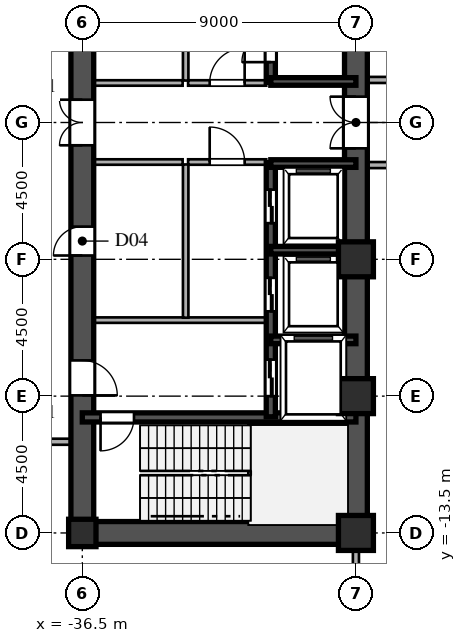
"""IFC4 building model, lengths in metres.
Left out: names, types, materials, properties, quantities, classifications, styles, units other than length and angle.
Written with IfcOpenShell. Run it as: python <this file> out.ifc"""

import sys

from ifc_helpers import new_model, si_unit, direction, frame, frame_2d, origin, origin_2d, place, context, subcontext, project, spatial, rectangle, hollow_rectangle, i_section, extrude, source, transform, mapped, element, fill, save


model = new_model("IFC4")
c1 = context("Model", 3, precision=1e-05, world=origin(), true_north=direction((0.0, 1.0)))
c2 = subcontext(c1, "Body", "Model", "MODEL_VIEW")
j1 = project(units=[si_unit("LENGTHUNIT", "METRE"), si_unit("PLANEANGLEUNIT", "RADIAN")], contexts=[c1])
p1 = place(None, origin())
s1 = spatial("IfcSite", under=j1, at=p1, CompositionType="ELEMENT")
p2 = place(p1, origin())
s2 = spatial("IfcBuilding", under=s1, at=p2, CompositionType="ELEMENT")
p3 = place(p2, frame((0.0, 0.0, -9.6)))
s3 = spatial("IfcBuildingStorey", under=s2, at=p3, CompositionType="ELEMENT", Elevation=-9.6)
m1 = source(origin(), c2, "Body", "SweptSolid", [
    extrude(hollow_rectangle(XDim=1.15, YDim=1.15, WallThickness=0.048, at=origin_2d()), origin(), (0.0, 0.0, 1.0), 4.8),
])
for number, where, z_axis, x_axis in (
    (1, (-27.5, -13.5, 0.0), (0.0, 0.0, 1.0), (1.0, 0.0, 0.0)),
    (2, (-27.5, -9.0, 0.0), (0.0, 0.0, 1.0), (1.0, 0.0, 0.0)),
    (3, (-27.5, -4.5, 0.0), (0.0, 0.0, 1.0), (1.0, 0.0, 0.0)),
):
    element("IfcColumn", number, at=place(p3, frame(where, z_axis=z_axis, x_axis=x_axis)), inside=s3, PredefinedType="COLUMN", context=c2, shape_type="MappedRepresentation", body=[
        mapped(m1, transform((0.0, 0.0, 0.0), scale=1.0)),
    ])
m2 = source(origin(), c2, "Body", "SweptSolid", [
    extrude(i_section(OverallWidth=0.9, OverallDepth=0.9, WebThickness=0.036, FlangeThickness=0.055, at=origin_2d()), origin(), (0.0, 0.0, 1.0), 4.8),
])
p4 = place(p3, frame((-36.5, -13.5, 0.0), z_axis=(0.0, 0.0, 1.0), x_axis=(1.0, 0.0, 0.0)))
e4 = element("IfcColumn", 4, at=p4, inside=s3, PredefinedType="COLUMN", context=c2, shape_type="MappedRepresentation", body=[
    mapped(m2, transform((0.0, 0.0, 0.0), scale=1.0)),
])
for number, where, z_axis, x_axis in (
    (5, (-27.5, -13.5, 0.0), (0.0, 0.0, 1.0), (0.0, 1.0, 0.0)),
    (6, (-27.5, 1.3, 0.0), (0.0, 0.0, 1.0), (0.0, 1.0, 0.0)),
):
    element("IfcWall", number, at=place(p3, frame(where, z_axis=z_axis, x_axis=x_axis)), inside=s3, PredefinedType="SHEAR", context=c2, shape_type="SweptSolid", body=[
        extrude(rectangle(XDim=12.2, YDim=0.75, at=frame_2d((6.1, 0.0))), origin(), (0.0, 0.0, 1.0), 4.5),
    ])
p5 = place(p3, frame((-27.5, -1.3, 0.0), z_axis=(0.0, 0.0, 1.0), x_axis=(0.0, 1.0, 0.0)))
e7 = element("IfcWall", 7, at=p5, inside=s3, PredefinedType="SHEAR", context=c2, shape_type="SweptSolid", body=[
    extrude(rectangle(XDim=2.6, YDim=0.75, at=frame_2d((1.3, 0.0))), origin(), (0.0, 0.0, 1.0), 4.5),
])
p6 = place(p5, frame((0.45, 0.0, 0.0)))
e8 = element("IfcOpeningElement", 8, at=p6, cuts=e7, PredefinedType="OPENING", context=c2, shape_type="SweptSolid", body=[
    extrude(rectangle(XDim=1.7, YDim=2.35, at=frame_2d((0.85, 1.175))), frame((0.0, 0.385, 0.0), z_axis=(0.0, -1.0, 0.0), x_axis=(1.0, 0.0, 0.0)), (0.0, 0.0, 1.0), 0.77),
])
p7 = place(p3, frame((-36.5, -13.5, 0.0), z_axis=(0.0, 0.0, 1.0), x_axis=(1.0, 0.0, 0.0)))
e9 = element("IfcWall", 9, at=p7, inside=s3, PredefinedType="SHEAR", context=c2, shape_type="SweptSolid", body=[
    extrude(rectangle(XDim=9.0, YDim=0.75, at=frame_2d((4.5, 0.0))), origin(), (0.0, 0.0, 1.0), 4.5),
])
p8 = place(p3, frame((-36.5, -13.65, 0.0), z_axis=(0.0, 0.0, 1.0), x_axis=(0.0, 1.0, 0.0)))
e10 = element("IfcWall", 10, at=p8, inside=s3, PredefinedType="SHEAR", context=c2, shape_type="SweptSolid", body=[
    extrude(rectangle(XDim=7.15, YDim=0.75, at=frame_2d((3.575, 0.0))), origin(), (0.0, 0.0, 1.0), 4.5),
])
p9 = place(p8, frame((4.675, 0.0, 0.0)))
e11 = element("IfcOpeningElement", 11, at=p9, cuts=e10, PredefinedType="OPENING", context=c2, shape_type="SweptSolid", body=[
    extrude(rectangle(XDim=1.15, YDim=2.2, at=frame_2d((0.575, 1.1))), frame((0.0, 0.385, 0.0), z_axis=(0.0, -1.0, 0.0), x_axis=(1.0, 0.0, 0.0)), (0.0, 0.0, 1.0), 0.77),
])
p10 = place(p3, frame((-36.5, -1.3, 0.0), z_axis=(0.0, 0.0, 1.0), x_axis=(0.0, 1.0, 0.0)))
e12 = element("IfcWall", 12, at=p10, inside=s3, PredefinedType="SHEAR", context=c2, shape_type="SweptSolid", body=[
    extrude(rectangle(XDim=2.6, YDim=0.75, at=frame_2d((1.3, 0.0))), origin(), (0.0, 0.0, 1.0), 4.5),
])
p11 = place(p10, frame((0.55, 0.0, 0.0)))
e13 = element("IfcOpeningElement", 13, at=p11, cuts=e12, PredefinedType="OPENING", context=c2, shape_type="SweptSolid", body=[
    extrude(rectangle(XDim=1.5, YDim=2.3, at=frame_2d((0.75, 1.15))), frame((0.0, 0.385, 0.0), z_axis=(0.0, -1.0, 0.0), x_axis=(1.0, 0.0, 0.0)), (0.0, 0.0, 1.0), 0.77),
])
p12 = place(p3, frame((-36.5, -6.5, 0.0), z_axis=(0.0, 0.0, 1.0), x_axis=(0.0, 1.0, 0.0)))
e14 = element("IfcWall", 14, at=p12, inside=s3, PredefinedType="SHEAR", context=c2, shape_type="SweptSolid", body=[
    extrude(rectangle(XDim=5.2, YDim=0.75, at=frame_2d((2.6, 0.0))), origin(), (0.0, 0.0, 1.0), 4.5),
])
p13 = place(p12, frame((2.125, 0.0, 0.0)))
e15 = element("IfcOpeningElement", 15, at=p13, cuts=e14, PredefinedType="OPENING", context=c2, shape_type="SweptSolid", body=[
    extrude(rectangle(XDim=0.95, YDim=2.15, at=frame_2d((0.475, 1.075))), frame((0.0, 0.385, 0.0), z_axis=(0.0, -1.0, 0.0), x_axis=(1.0, 0.0, 0.0)), (0.0, 0.0, 1.0), 0.77),
])
p14 = place(p3, frame((-36.5, 1.3, 0.0), z_axis=(0.0, 0.0, 1.0), x_axis=(0.0, 1.0, 0.0)))
e16 = element("IfcWall", 16, at=p14, inside=s3, PredefinedType="SHEAR", context=c2, shape_type="SweptSolid", body=[
    extrude(rectangle(XDim=6.9, YDim=0.75, at=frame_2d((3.45, 0.0))), origin(), (0.0, 0.0, 1.0), 4.5),
])
p15 = place(p14, frame((2.975, 0.0, 0.0)))
e17 = element("IfcOpeningElement", 17, at=p15, cuts=e16, PredefinedType="OPENING", context=c2, shape_type="SweptSolid", body=[
    extrude(rectangle(XDim=0.95, YDim=2.15, at=frame_2d((0.475, 1.075))), frame((0.0, 0.385, 0.0), z_axis=(0.0, -1.0, 0.0), x_axis=(1.0, 0.0, 0.0)), (0.0, 0.0, 1.0), 0.77),
])
p16 = place(p3, frame((-36.5, -9.7, 0.0), z_axis=(0.0, 0.0, 1.0), x_axis=(1.0, 0.0, 0.0)))
e18 = element("IfcWall", 18, at=p16, inside=s3, PredefinedType="SHEAR", context=c2, shape_type="SweptSolid", body=[
    extrude(rectangle(XDim=9.0, YDim=0.3, at=frame_2d((4.5, 0.0))), origin(), (0.0, 0.0, 1.0), 4.5),
])
p17 = place(p16, frame((0.6, 0.0, 0.0)))
e19 = element("IfcOpeningElement", 19, at=p17, cuts=e18, PredefinedType="OPENING", context=c2, shape_type="SweptSolid", body=[
    extrude(rectangle(XDim=1.1, YDim=2.2, at=frame_2d((0.55, 1.1))), frame((0.0, 0.16, 0.0), z_axis=(0.0, -1.0, 0.0), x_axis=(1.0, 0.0, 0.0)), (0.0, 0.0, 1.0), 0.32),
])
for number, where, z_axis, x_axis in (
    (20, (-30.3, -7.15, 0.0), (0.0, 0.0, 1.0), (1.0, 0.0, 0.0)),
    (21, (-30.3, -4.2, 0.0), (0.0, 0.0, 1.0), (1.0, 0.0, 0.0)),
    (22, (-30.3, -1.35, 0.0), (0.0, 0.0, 1.0), (1.0, 0.0, 0.0)),
    (23, (-30.3, 1.35, 0.0), (0.0, 0.0, 1.0), (1.0, 0.0, 0.0)),
):
    element("IfcWall", number, at=place(p3, frame(where, z_axis=z_axis, x_axis=x_axis)), inside=s3, PredefinedType="SHEAR", context=c2, shape_type="SweptSolid", body=[
        extrude(rectangle(XDim=2.8, YDim=0.25, at=frame_2d((1.4, 0.0))), origin(), (0.0, 0.0, 1.0), 4.5),
    ])
p18 = place(p3, frame((-30.3, -9.68, 0.0), z_axis=(0.0, 0.0, 1.0), x_axis=(0.0, 1.0, 0.0)))
e24 = element("IfcWall", 24, at=p18, inside=s3, PredefinedType="SHEAR", context=c2, shape_type="SweptSolid", body=[
    extrude(rectangle(XDim=2.56, YDim=0.3, at=frame_2d((1.28, 0.0))), origin(), (0.0, 0.0, 1.0), 4.5),
])
p19 = place(p18, frame((0.68, 0.0, 0.0)))
e25 = element("IfcOpeningElement", 25, at=p19, cuts=e24, PredefinedType="OPENING", context=c2, shape_type="SweptSolid", body=[
    extrude(rectangle(XDim=1.2, YDim=2.25, at=frame_2d((0.6, 1.125))), frame((0.0, 0.16, 0.0), z_axis=(0.0, -1.0, 0.0), x_axis=(1.0, 0.0, 0.0)), (0.0, 0.0, 1.0), 0.32),
])
p20 = place(p3, frame((-30.3, -7.12, 0.0), z_axis=(0.0, 0.0, 1.0), x_axis=(0.0, 1.0, 0.0)))
e26 = element("IfcWall", 26, at=p20, inside=s3, PredefinedType="SHEAR", context=c2, shape_type="SweptSolid", body=[
    extrude(rectangle(XDim=2.92, YDim=0.3, at=frame_2d((1.46, 0.0))), origin(), (0.0, 0.0, 1.0), 4.5),
])
p21 = place(p20, frame((0.91, 0.0, 0.0)))
e27 = element("IfcOpeningElement", 27, at=p21, cuts=e26, PredefinedType="OPENING", context=c2, shape_type="SweptSolid", body=[
    extrude(rectangle(XDim=1.1, YDim=2.2, at=frame_2d((0.55, 1.1))), frame((0.0, 0.16, 0.0), z_axis=(0.0, -1.0, 0.0), x_axis=(1.0, 0.0, 0.0)), (0.0, 0.0, 1.0), 0.32),
])
p22 = place(p3, frame((-30.3, -4.2, 0.0), z_axis=(0.0, 0.0, 1.0), x_axis=(0.0, 1.0, 0.0)))
e28 = element("IfcWall", 28, at=p22, inside=s3, PredefinedType="SHEAR", context=c2, shape_type="SweptSolid", body=[
    extrude(rectangle(XDim=2.88, YDim=0.3, at=frame_2d((1.44, 0.0))), origin(), (0.0, 0.0, 1.0), 4.5),
])
p23 = place(p22, frame((0.89, 0.0, 0.0)))
e29 = element("IfcOpeningElement", 29, at=p23, cuts=e28, PredefinedType="OPENING", context=c2, shape_type="SweptSolid", body=[
    extrude(rectangle(XDim=1.1, YDim=2.2, at=frame_2d((0.55, 1.1))), frame((0.0, 0.16, 0.0), z_axis=(0.0, -1.0, 0.0), x_axis=(1.0, 0.0, 0.0)), (0.0, 0.0, 1.0), 0.32),
])
p24 = place(p3, frame((-30.3, 1.32, 0.0), z_axis=(0.0, 0.0, 1.0), x_axis=(0.0, 1.0, 0.0)))
e30 = element("IfcWall", 30, at=p24, inside=s3, PredefinedType="SHEAR", context=c2, shape_type="SweptSolid", body=[
    extrude(rectangle(XDim=2.28, YDim=0.3, at=frame_2d((1.14, 0.0))), origin(), (0.0, 0.0, 1.0), 4.5),
])
p25 = place(p24, frame((0.665, 0.0, 0.0)))
e31 = element("IfcOpeningElement", 31, at=p25, cuts=e30, PredefinedType="OPENING", context=c2, shape_type="SweptSolid", body=[
    extrude(rectangle(XDim=0.95, YDim=2.15, at=frame_2d((0.475, 1.075))), frame((0.0, 0.16, 0.0), z_axis=(0.0, -1.0, 0.0), x_axis=(1.0, 0.0, 0.0)), (0.0, 0.0, 1.0), 0.32),
])
p26 = place(p3, frame((-36.15, -6.5, 0.0), z_axis=(0.0, 0.0, 1.0), x_axis=(1.0, 0.0, 0.0)))
e32 = element("IfcWall", 32, at=p26, inside=s3, PredefinedType="PARTITIONING", context=c2, shape_type="SweptSolid", body=[
    extrude(rectangle(XDim=5.7, YDim=0.18, at=frame_2d((2.85, 0.0))), origin(), (0.0, 0.0, 1.0), 4.5),
])
p27 = place(p3, frame((-33.1, -6.42, 0.0), z_axis=(0.0, 0.0, 1.0), x_axis=(0.0, 1.0, 0.0)))
e33 = element("IfcWall", 33, at=p27, inside=s3, PredefinedType="PARTITIONING", context=c2, shape_type="SweptSolid", body=[
    extrude(rectangle(XDim=5.04, YDim=0.18, at=frame_2d((2.52, 0.0))), origin(), (0.0, 0.0, 1.0), 4.5),
])
p28 = place(p3, frame((-33.1, 1.38, 0.0), z_axis=(0.0, 0.0, 1.0), x_axis=(0.0, 1.0, 0.0)))
e34 = element("IfcWall", 34, at=p28, inside=s3, PredefinedType="PARTITIONING", context=c2, shape_type="SweptSolid", body=[
    extrude(rectangle(XDim=6.74, YDim=0.18, at=frame_2d((3.37, 0.0))), origin(), (0.0, 0.0, 1.0), 4.5),
])
p29 = place(p3, frame((-33.02, -1.3, 0.0), z_axis=(0.0, 0.0, 1.0), x_axis=(1.0, 0.0, 0.0)))
e35 = element("IfcWall", 35, at=p29, inside=s3, PredefinedType="PARTITIONING", context=c2, shape_type="SweptSolid", body=[
    extrude(rectangle(XDim=2.57, YDim=0.18, at=frame_2d((1.285, 0.0))), origin(), (0.0, 0.0, 1.0), 4.5),
])
p30 = place(p29, frame((0.71, 0.0, 0.0)))
e36 = element("IfcOpeningElement", 36, at=p30, cuts=e35, PredefinedType="OPENING", context=c2, shape_type="SweptSolid", body=[
    extrude(rectangle(XDim=1.15, YDim=2.2, at=frame_2d((0.575, 1.1))), frame((0.0, 0.1, 0.0), z_axis=(0.0, -1.0, 0.0), x_axis=(1.0, 0.0, 0.0)), (0.0, 0.0, 1.0), 0.2),
])
p31 = place(p3, frame((-33.02, 1.3, 0.0), z_axis=(0.0, 0.0, 1.0), x_axis=(1.0, 0.0, 0.0)))
e37 = element("IfcWall", 37, at=p31, inside=s3, PredefinedType="PARTITIONING", context=c2, shape_type="SweptSolid", body=[
    extrude(rectangle(XDim=2.57, YDim=0.18, at=frame_2d((1.285, 0.0))), origin(), (0.0, 0.0, 1.0), 4.5),
])
p32 = place(p31, frame((0.71, 0.0, 0.0)))
e38 = element("IfcOpeningElement", 38, at=p32, cuts=e37, PredefinedType="OPENING", context=c2, shape_type="SweptSolid", body=[
    extrude(rectangle(XDim=1.15, YDim=2.2, at=frame_2d((0.575, 1.1))), frame((0.0, 0.1, 0.0), z_axis=(0.0, -1.0, 0.0), x_axis=(1.0, 0.0, 0.0)), (0.0, 0.0, 1.0), 0.2),
])
for number, where, z_axis, x_axis in (
    (39, (-36.15, -1.3, 0.0), (0.0, 0.0, 1.0), (1.0, 0.0, 0.0)),
    (40, (-36.15, 1.3, 0.0), (0.0, 0.0, 1.0), (1.0, 0.0, 0.0)),
):
    element("IfcWall", number, at=place(p3, frame(where, z_axis=z_axis, x_axis=x_axis)), inside=s3, PredefinedType="PARTITIONING", context=c2, shape_type="SweptSolid", body=[
        extrude(rectangle(XDim=2.95, YDim=0.18, at=frame_2d((1.475, 0.0))), origin(), (0.0, 0.0, 1.0), 4.5),
    ])
p33 = place(p3, frame((-38.915, -10.5, 0.0), z_axis=(0.0, 0.0, 1.0), x_axis=(1.0, 0.0, 0.0)))
e41 = element("IfcWall", 41, at=p33, inside=s3, PredefinedType="PARTITIONING", context=c2, shape_type="SweptSolid", body=[
    extrude(rectangle(XDim=2.035, YDim=0.2, at=frame_2d((1.018, 0.0))), origin(), (0.0, 0.0, 1.0), 4.5),
])
p34 = place(p3, frame((-27.12, -1.4, 0.0), z_axis=(0.0, 0.0, 1.0), x_axis=(1.0, 0.0, 0.0)))
e42 = element("IfcWall", 42, at=p34, inside=s3, PredefinedType="PARTITIONING", context=c2, shape_type="SweptSolid", body=[
    extrude(rectangle(XDim=54.24, YDim=0.2, at=frame_2d((27.12, 0.0))), origin(), (0.0, 0.0, 1.0), 4.5),
])
p35 = place(p34, frame((15.545, 0.0, 0.0)))
e43 = element("IfcOpeningElement", 43, at=p35, cuts=e42, PredefinedType="OPENING", context=c2, shape_type="SweptSolid", body=[
    extrude(rectangle(XDim=1.15, YDim=2.2, at=frame_2d((0.575, 1.1))), frame((0.0, 0.11, 0.0), z_axis=(0.0, -1.0, 0.0), x_axis=(1.0, 0.0, 0.0)), (0.0, 0.0, 1.0), 0.22),
])
p36 = place(p34, frame((37.545, 0.0, 0.0)))
e44 = element("IfcOpeningElement", 44, at=p36, cuts=e42, PredefinedType="OPENING", context=c2, shape_type="SweptSolid", body=[
    extrude(rectangle(XDim=1.15, YDim=2.2, at=frame_2d((0.575, 1.1))), frame((0.0, 0.11, 0.0), z_axis=(0.0, -1.0, 0.0), x_axis=(1.0, 0.0, 0.0)), (0.0, 0.0, 1.0), 0.22),
])
p37 = place(p3, frame((-27.12, 1.4, 0.0), z_axis=(0.0, 0.0, 1.0), x_axis=(1.0, 0.0, 0.0)))
e45 = element("IfcWall", 45, at=p37, inside=s3, PredefinedType="PARTITIONING", context=c2, shape_type="SweptSolid", body=[
    extrude(rectangle(XDim=54.24, YDim=0.2, at=frame_2d((27.12, 0.0))), origin(), (0.0, 0.0, 1.0), 4.5),
])
p38 = place(p37, frame((19.545, 0.0, 0.0)))
e46 = element("IfcOpeningElement", 46, at=p38, cuts=e45, PredefinedType="OPENING", context=c2, shape_type="SweptSolid", body=[
    extrude(rectangle(XDim=1.15, YDim=2.2, at=frame_2d((0.575, 1.1))), frame((0.0, 0.11, 0.0), z_axis=(0.0, -1.0, 0.0), x_axis=(1.0, 0.0, 0.0)), (0.0, 0.0, 1.0), 0.22),
])
p39 = place(p37, frame((46.93, 0.0, 0.0)))
e47 = element("IfcOpeningElement", 47, at=p39, cuts=e45, PredefinedType="OPENING", context=c2, shape_type="SweptSolid", body=[
    extrude(rectangle(XDim=0.88, YDim=2.1, at=frame_2d((0.44, 1.05))), frame((0.0, 0.11, 0.0), z_axis=(0.0, -1.0, 0.0), x_axis=(1.0, 0.0, 0.0)), (0.0, 0.0, 1.0), 0.22),
])
p40 = place(p3, frame((-27.5, -21.812, 0.0), z_axis=(0.0, 0.0, 1.0), x_axis=(0.0, 1.0, 0.0)))
e48 = element("IfcWall", 48, at=p40, inside=s3, PredefinedType="PARTITIONING", context=c2, shape_type="SweptSolid", body=[
    extrude(rectangle(XDim=7.933, YDim=0.2, at=frame_2d((3.966, 0.0))), origin(), (0.0, 0.0, 1.0), 3.912),
])
m3 = source(origin(), c2, "Body", "SweptSolid", [
    extrude(rectangle(XDim=1.7, YDim=2.35, at=frame_2d((0.85, 1.175))), frame((0.0, 0.025, 0.0), z_axis=(0.0, -1.0, 0.0), x_axis=(1.0, 0.0, 0.0)), (0.0, 0.0, 1.0), 0.05),
])
p41 = place(p6, origin())
e49 = element("IfcDoor", 49, at=p41, inside=s3, OperationType="DOUBLE_SWING_LEFT", PredefinedType="DOOR", context=c2, shape_type="MappedRepresentation", body=[
    mapped(m3, transform((0.0, 0.0, 0.0), scale=1.0)),
])
fill(e8, e49)
m4 = source(origin(), c2, "Body", "SweptSolid", [
    extrude(rectangle(XDim=1.15, YDim=2.2, at=frame_2d((0.575, 1.1))), frame((0.0, 0.025, 0.0), z_axis=(0.0, -1.0, 0.0), x_axis=(1.0, 0.0, 0.0)), (0.0, 0.0, 1.0), 0.05),
])
p42 = place(p9, frame((1.15, 0.0, 0.0), z_axis=(0.0, 0.0, 1.0), x_axis=(-1.0, 0.0, 0.0)))
e50 = element("IfcDoor", 50, at=p42, inside=s3, OperationType="SINGLE_SWING_LEFT", PredefinedType="DOOR", context=c2, shape_type="MappedRepresentation", body=[
    mapped(m4, transform((0.0, 0.0, 0.0), scale=1.0)),
])
fill(e11, e50)
m5 = source(origin(), c2, "Body", "SweptSolid", [
    extrude(rectangle(XDim=1.5, YDim=2.3, at=frame_2d((0.75, 1.15))), frame((0.0, 0.025, 0.0), z_axis=(0.0, -1.0, 0.0), x_axis=(1.0, 0.0, 0.0)), (0.0, 0.0, 1.0), 0.05),
])
p43 = place(p11, origin())
e51 = element("IfcDoor", 51, at=p43, inside=s3, OperationType="DOUBLE_SWING_LEFT", PredefinedType="DOOR", context=c2, shape_type="MappedRepresentation", body=[
    mapped(m5, transform((0.0, 0.0, 0.0), scale=1.0)),
])
fill(e13, e51)
m6 = source(origin(), c2, "Body", "SweptSolid", [
    extrude(rectangle(XDim=0.95, YDim=2.15, at=frame_2d((0.475, 1.075))), frame((0.0, 0.025, 0.0), z_axis=(0.0, -1.0, 0.0), x_axis=(1.0, 0.0, 0.0)), (0.0, 0.0, 1.0), 0.05),
])
p44 = place(p13, origin())
e52 = element("IfcDoor", 52, at=p44, inside=s3, OperationType="SINGLE_SWING_LEFT", PredefinedType="DOOR", context=c2, shape_type="MappedRepresentation", body=[
    mapped(m6, transform((0.0, 0.0, 0.0), scale=1.0)),
])
fill(e15, e52)
m7 = source(origin(), c2, "Body", "SweptSolid", [
    extrude(rectangle(XDim=1.1, YDim=2.2, at=frame_2d((0.55, 1.1))), frame((0.0, 0.025, 0.0), z_axis=(0.0, -1.0, 0.0), x_axis=(1.0, 0.0, 0.0)), (0.0, 0.0, 1.0), 0.05),
])
p45 = place(p17, frame((1.1, 0.0, 0.0), z_axis=(0.0, 0.0, 1.0), x_axis=(-1.0, 0.0, 0.0)))
e53 = element("IfcDoor", 53, at=p45, inside=s3, OperationType="SINGLE_SWING_LEFT", PredefinedType="DOOR", context=c2, shape_type="MappedRepresentation", body=[
    mapped(m7, transform((0.0, 0.0, 0.0), scale=1.0)),
])
fill(e19, e53)
m8 = source(origin(), c2, "Body", "SweptSolid", [
    extrude(rectangle(XDim=1.2, YDim=2.25, at=frame_2d((0.6, 1.125))), frame((0.0, 0.025, 0.0), z_axis=(0.0, -1.0, 0.0), x_axis=(1.0, 0.0, 0.0)), (0.0, 0.0, 1.0), 0.05),
])
p46 = place(p19, origin())
e54 = element("IfcDoor", 54, at=p46, inside=s3, OperationType="DOUBLE_DOOR_SLIDING", PredefinedType="DOOR", context=c2, shape_type="MappedRepresentation", body=[
    mapped(m8, transform((0.0, 0.0, 0.0), scale=1.0)),
])
fill(e25, e54)
m9 = source(origin(), c2, "Body", "SweptSolid", [
    extrude(rectangle(XDim=1.1, YDim=2.2, at=frame_2d((0.55, 1.1))), frame((0.0, 0.025, 0.0), z_axis=(0.0, -1.0, 0.0), x_axis=(1.0, 0.0, 0.0)), (0.0, 0.0, 1.0), 0.05),
])
p47 = place(p21, origin())
e55 = element("IfcDoor", 55, at=p47, inside=s3, OperationType="DOUBLE_DOOR_SLIDING", PredefinedType="DOOR", context=c2, shape_type="MappedRepresentation", body=[
    mapped(m9, transform((0.0, 0.0, 0.0), scale=1.0)),
])
fill(e27, e55)
p48 = place(p23, origin())
e56 = element("IfcDoor", 56, at=p48, inside=s3, OperationType="DOUBLE_DOOR_SLIDING", PredefinedType="DOOR", context=c2, shape_type="MappedRepresentation", body=[
    mapped(m9, transform((0.0, 0.0, 0.0), scale=1.0)),
])
fill(e29, e56)
p49 = place(p25, origin())
e57 = element("IfcDoor", 57, at=p49, inside=s3, OperationType="SINGLE_SWING_LEFT", PredefinedType="DOOR", context=c2, shape_type="MappedRepresentation", body=[
    mapped(m6, transform((0.0, 0.0, 0.0), scale=1.0)),
])
fill(e31, e57)
p50 = place(p30, origin())
e58 = element("IfcDoor", 58, at=p50, inside=s3, OperationType="SINGLE_SWING_LEFT", PredefinedType="DOOR", context=c2, shape_type="MappedRepresentation", body=[
    mapped(m4, transform((0.0, 0.0, 0.0), scale=1.0)),
])
fill(e36, e58)
p51 = place(p32, origin())
e59 = element("IfcDoor", 59, at=p51, inside=s3, OperationType="SINGLE_SWING_RIGHT", PredefinedType="DOOR", context=c2, shape_type="MappedRepresentation", body=[
    mapped(m4, transform((0.0, 0.0, 0.0), scale=1.0)),
])
fill(e38, e59)
save(model, sys.argv[1])
